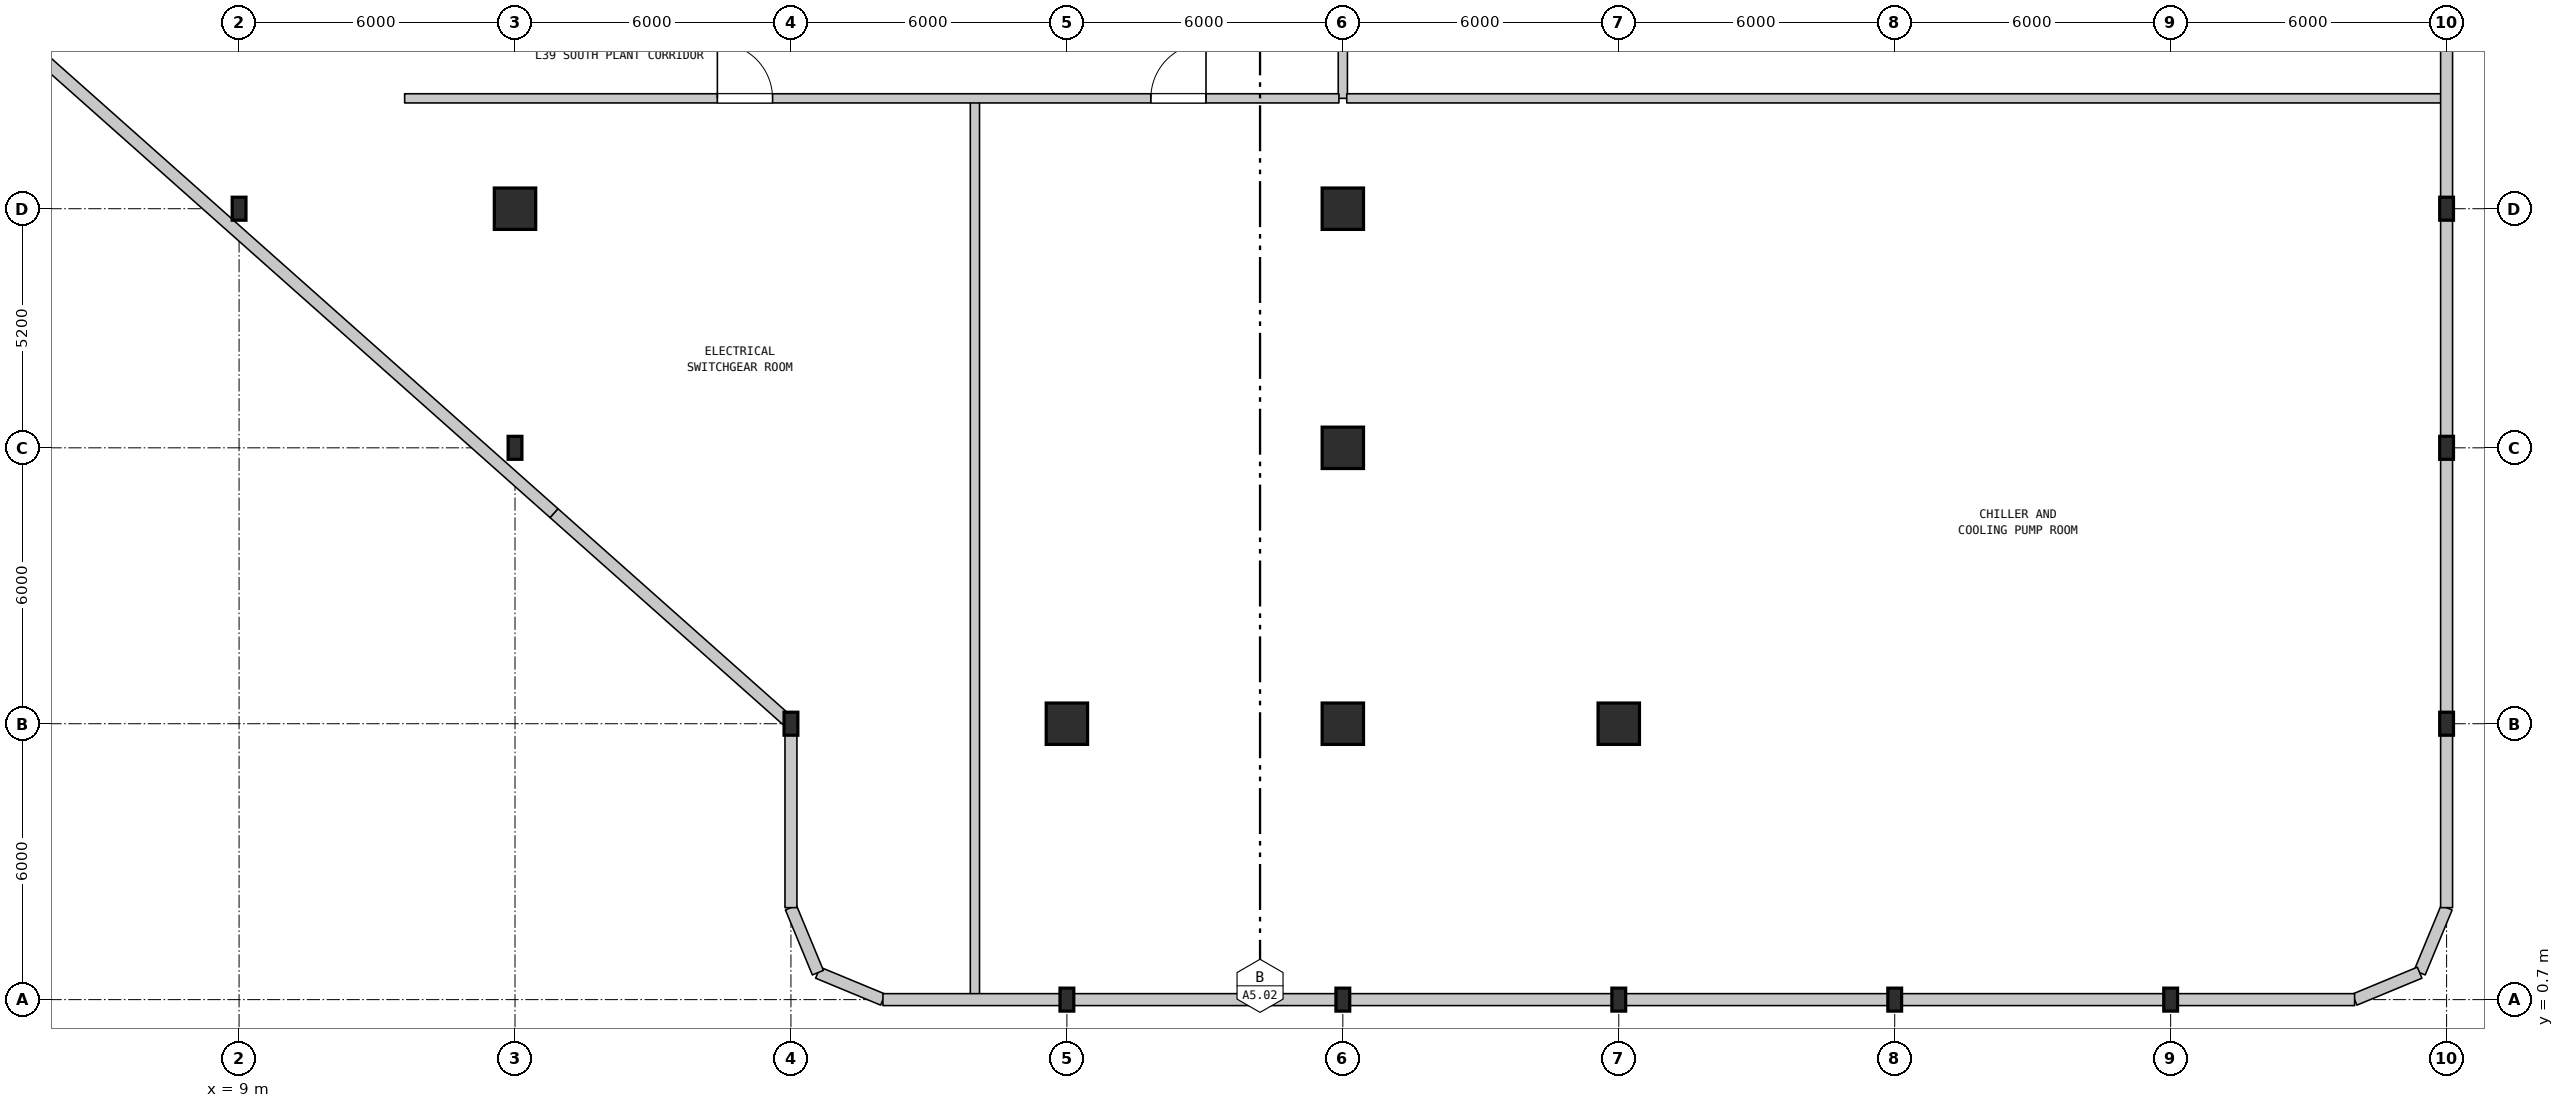
"""IFC4 building model, lengths in metres.
Left out: names, types, materials, properties, quantities, classifications, styles, units other than length and angle.
Written with IfcOpenShell. Run it as: python <this file> out.ifc"""

import sys

from ifc_helpers import new_model, si_unit, direction, frame, frame_2d, origin, origin_2d, place, context, subcontext, project, spatial, rectangle, i_section, extrude, element, fill, save


model = new_model("IFC4")
c1 = context("Model", 3, precision=1e-05, world=origin(), true_north=direction((0.0, 1.0)))
c2 = subcontext(c1, "Body", "Model", "MODEL_VIEW")
j1 = project(units=[si_unit("LENGTHUNIT", "METRE"), si_unit("PLANEANGLEUNIT", "RADIAN")], contexts=[c1])
p1 = place(None, origin())
s1 = spatial("IfcSite", under=j1, at=p1, CompositionType="ELEMENT")
p2 = place(p1, origin())
s2 = spatial("IfcBuilding", under=s1, at=p2, CompositionType="ELEMENT")
p3 = place(p2, frame((0.0, 0.0, 159.4)))
s3 = spatial("IfcBuildingStorey", under=s2, at=p3, CompositionType="ELEMENT", Elevation=159.4)
for number, where, z_axis, x_axis in (
    (1, (9.0, 17.9, 0.0), (0.0, 0.0, 1.0), (1.0, 0.0, 0.0)),
    (2, (15.0, 12.7, 0.0), (0.0, 0.0, 1.0), (1.0, 0.0, 0.0)),
):
    element("IfcColumn", number, at=place(p3, frame(where, z_axis=z_axis, x_axis=x_axis)), inside=s3, PredefinedType="COLUMN", context=c2, shape_type="SweptSolid", body=[
        extrude(i_section(OverallWidth=0.3, OverallDepth=0.5, WebThickness=0.014, FlangeThickness=0.028, FilletRadius=0.027, at=origin_2d()), origin(), (0.0, 0.0, 1.0), 5.2),
    ])
p4 = place(p3, frame((15.0, 17.9, 0.0), z_axis=(0.0, 0.0, 1.0), x_axis=(1.0, 0.0, 0.0)))
e3 = element("IfcColumn", 3, at=p4, inside=s3, PredefinedType="COLUMN", context=c2, shape_type="SweptSolid", body=[
    extrude(rectangle(XDim=0.9, YDim=0.9, at=origin_2d()), origin(), (0.0, 0.0, 1.0), 5.2),
])
for number, where, z_axis, x_axis in (
    (4, (21.0, 6.7, 0.0), (0.0, 0.0, 1.0), (1.0, 0.0, 0.0)),
    (5, (27.0, 0.7, 0.0), (0.0, 0.0, 1.0), (1.0, 0.0, 0.0)),
):
    element("IfcColumn", number, at=place(p3, frame(where, z_axis=z_axis, x_axis=x_axis)), inside=s3, PredefinedType="COLUMN", context=c2, shape_type="SweptSolid", body=[
        extrude(i_section(OverallWidth=0.3, OverallDepth=0.5, WebThickness=0.014, FlangeThickness=0.028, FilletRadius=0.027, at=origin_2d()), origin(), (0.0, 0.0, 1.0), 5.2),
    ])
p5 = place(p3, frame((27.0, 6.7, 0.0), z_axis=(0.0, 0.0, 1.0), x_axis=(1.0, 0.0, 0.0)))
e6 = element("IfcColumn", 6, at=p5, inside=s3, PredefinedType="COLUMN", context=c2, shape_type="SweptSolid", body=[
    extrude(rectangle(XDim=0.9, YDim=0.9, at=origin_2d()), origin(), (0.0, 0.0, 1.0), 5.2),
])
p6 = place(p3, frame((33.0, 0.7, 0.0), z_axis=(0.0, 0.0, 1.0), x_axis=(1.0, 0.0, 0.0)))
e7 = element("IfcColumn", 7, at=p6, inside=s3, PredefinedType="COLUMN", context=c2, shape_type="SweptSolid", body=[
    extrude(i_section(OverallWidth=0.3, OverallDepth=0.5, WebThickness=0.014, FlangeThickness=0.028, FilletRadius=0.027, at=origin_2d()), origin(), (0.0, 0.0, 1.0), 5.2),
])
for number, where, z_axis, x_axis in (
    (8, (33.0, 6.7, 0.0), (0.0, 0.0, 1.0), (1.0, 0.0, 0.0)),
    (9, (33.0, 12.7, 0.0), (0.0, 0.0, 1.0), (1.0, 0.0, 0.0)),
    (10, (33.0, 17.9, 0.0), (0.0, 0.0, 1.0), (1.0, 0.0, 0.0)),
):
    element("IfcColumn", number, at=place(p3, frame(where, z_axis=z_axis, x_axis=x_axis)), inside=s3, PredefinedType="COLUMN", context=c2, shape_type="SweptSolid", body=[
        extrude(rectangle(XDim=0.9, YDim=0.9, at=origin_2d()), origin(), (0.0, 0.0, 1.0), 5.2),
    ])
p7 = place(p3, frame((39.0, 0.7, 0.0), z_axis=(0.0, 0.0, 1.0), x_axis=(1.0, 0.0, 0.0)))
e11 = element("IfcColumn", 11, at=p7, inside=s3, PredefinedType="COLUMN", context=c2, shape_type="SweptSolid", body=[
    extrude(i_section(OverallWidth=0.3, OverallDepth=0.5, WebThickness=0.014, FlangeThickness=0.028, FilletRadius=0.027, at=origin_2d()), origin(), (0.0, 0.0, 1.0), 5.2),
])
p8 = place(p3, frame((39.0, 6.7, 0.0), z_axis=(0.0, 0.0, 1.0), x_axis=(1.0, 0.0, 0.0)))
e12 = element("IfcColumn", 12, at=p8, inside=s3, PredefinedType="COLUMN", context=c2, shape_type="SweptSolid", body=[
    extrude(rectangle(XDim=0.9, YDim=0.9, at=origin_2d()), origin(), (0.0, 0.0, 1.0), 5.2),
])
for number, where, z_axis, x_axis in (
    (13, (45.0, 0.7, 0.0), (0.0, 0.0, 1.0), (1.0, 0.0, 0.0)),
    (14, (51.0, 0.7, 0.0), (0.0, 0.0, 1.0), (1.0, 0.0, 0.0)),
    (15, (57.0, 6.7, 0.0), (0.0, 0.0, 1.0), (1.0, 0.0, 0.0)),
    (16, (57.0, 12.7, 0.0), (0.0, 0.0, 1.0), (1.0, 0.0, 0.0)),
    (17, (57.0, 17.9, 0.0), (0.0, 0.0, 1.0), (1.0, 0.0, 0.0)),
):
    element("IfcColumn", number, at=place(p3, frame(where, z_axis=z_axis, x_axis=x_axis)), inside=s3, PredefinedType="COLUMN", context=c2, shape_type="SweptSolid", body=[
        extrude(i_section(OverallWidth=0.3, OverallDepth=0.5, WebThickness=0.014, FlangeThickness=0.028, FilletRadius=0.027, at=origin_2d()), origin(), (0.0, 0.0, 1.0), 5.2),
    ])
for number, where, z_axis, x_axis in (
    (18, (57.0, 2.7, 0.0), (0.0, 0.0, 1.0), (-0.383, -0.924, 0.0)),
    (19, (56.414, 1.286, 0.0), (0.0, 0.0, 1.0), (-0.924, -0.383, 0.0)),
):
    element("IfcWall", number, at=place(p3, frame(where, z_axis=z_axis, x_axis=x_axis)), inside=s3, PredefinedType="STANDARD", context=c2, shape_type="SweptSolid", body=[
        extrude(rectangle(XDim=1.531, YDim=0.26, at=frame_2d((0.765, 0.0))), origin(), (0.0, 0.0, 1.0), 4.89),
    ])
p9 = place(p3, frame((55.0, 0.7, 0.0), z_axis=(0.0, 0.0, 1.0), x_axis=(-1.0, 0.0, 0.0)))
e20 = element("IfcWall", 20, at=p9, inside=s3, PredefinedType="STANDARD", context=c2, shape_type="SweptSolid", body=[
    extrude(rectangle(XDim=4.0, YDim=0.26, at=frame_2d((2.0, 0.0))), origin(), (0.0, 0.0, 1.0), 4.89),
])
for number, where, z_axis, x_axis in (
    (21, (23.0, 0.7, 0.0), (0.0, 0.0, 1.0), (-0.924, 0.383, 0.0)),
    (22, (21.586, 1.286, 0.0), (0.0, 0.0, 1.0), (-0.383, 0.924, 0.0)),
):
    element("IfcWall", number, at=place(p3, frame(where, z_axis=z_axis, x_axis=x_axis)), inside=s3, PredefinedType="STANDARD", context=c2, shape_type="SweptSolid", body=[
        extrude(rectangle(XDim=1.531, YDim=0.26, at=frame_2d((0.765, 0.0))), origin(), (0.0, 0.0, 1.0), 4.89),
    ])
p10 = place(p3, frame((21.0, 2.7, 0.0), z_axis=(0.0, 0.0, 1.0), x_axis=(0.0, 1.0, 0.0)))
e23 = element("IfcWall", 23, at=p10, inside=s3, PredefinedType="STANDARD", context=c2, shape_type="SweptSolid", body=[
    extrude(rectangle(XDim=4.0, YDim=0.26, at=frame_2d((2.0, 0.0))), origin(), (0.0, 0.0, 1.0), 4.89),
])
p11 = place(p3, frame((21.0, 6.7, 0.0), z_axis=(0.0, 0.0, 1.0), x_axis=(-0.747413226797, 0.664359442177, 0.0)))
e24 = element("IfcWall", 24, at=p11, inside=s3, PredefinedType="STANDARD", context=c2, shape_type="SweptSolid", body=[
    extrude(rectangle(XDim=6.893, YDim=0.26, at=frame_2d((3.447, 0.0))), origin(), (0.0, 0.0, 1.0), 4.19),
])
p12 = place(p3, frame((25.0, 0.71, 0.0), z_axis=(0.0, 0.0, 1.0), x_axis=(0.0, 1.0, 0.0)))
e25 = element("IfcWall", 25, at=p12, inside=s3, PredefinedType="STANDARD", context=c2, shape_type="SweptSolid", body=[
    extrude(rectangle(XDim=19.59, YDim=0.2, at=frame_2d((9.795, 0.0))), origin(), (0.0, 0.0, 1.0), 4.89),
])
p13 = place(p3, frame((33.0, 20.3, 0.0), z_axis=(0.0, 0.0, 1.0), x_axis=(0.0, 1.0, 0.0)))
e26 = element("IfcWall", 26, at=p13, inside=s3, PredefinedType="STANDARD", context=c2, shape_type="SweptSolid", body=[
    extrude(rectangle(XDim=7.6, YDim=0.2, at=frame_2d((3.8, 0.0))), origin(), (0.0, 0.0, 1.0), 4.49),
])
p14 = place(p13, frame((4.6, 0.0, 0.0)))
e27 = element("IfcOpeningElement", 27, at=p14, cuts=e26, PredefinedType="OPENING", context=c2, shape_type="SweptSolid", body=[
    extrude(rectangle(XDim=1.2, YDim=2.2, at=frame_2d((0.6, 1.1))), frame((0.0, 0.11, 0.0), z_axis=(0.0, -1.0, 0.0), x_axis=(1.0, 0.0, 0.0)), (0.0, 0.0, 1.0), 0.22),
])
p15 = place(p3, frame((12.6, 20.3, 0.0), z_axis=(0.0, 0.0, 1.0), x_axis=(1.0, 0.0, 0.0)))
e28 = element("IfcWall", 28, at=p15, inside=s3, PredefinedType="STANDARD", context=c2, shape_type="SweptSolid", body=[
    extrude(rectangle(XDim=20.315, YDim=0.2, at=frame_2d((10.157, 0.0))), origin(), (0.0, 0.0, 1.0), 4.89),
])
p16 = place(p15, frame((6.8, 0.0, 0.0)))
e29 = element("IfcOpeningElement", 29, at=p16, cuts=e28, PredefinedType="OPENING", context=c2, shape_type="SweptSolid", body=[
    extrude(rectangle(XDim=1.2, YDim=2.2, at=frame_2d((0.6, 1.1))), frame((0.0, 0.11, 0.0), z_axis=(0.0, -1.0, 0.0), x_axis=(1.0, 0.0, 0.0)), (0.0, 0.0, 1.0), 0.22),
])
p17 = place(p15, frame((16.225, 0.0, 0.0)))
e30 = element("IfcOpeningElement", 30, at=p17, cuts=e28, PredefinedType="OPENING", context=c2, shape_type="SweptSolid", body=[
    extrude(rectangle(XDim=1.2, YDim=2.2, at=frame_2d((0.6, 1.1))), frame((0.0, 0.11, 0.0), z_axis=(0.0, -1.0, 0.0), x_axis=(1.0, 0.0, 0.0)), (0.0, 0.0, 1.0), 0.22),
])
p18 = place(p3, frame((33.085, 20.3, 0.0), z_axis=(0.0, 0.0, 1.0), x_axis=(1.0, 0.0, 0.0)))
e31 = element("IfcWall", 31, at=p18, inside=s3, PredefinedType="STANDARD", context=c2, shape_type="SweptSolid", body=[
    extrude(rectangle(XDim=23.905, YDim=0.2, at=frame_2d((11.953, 0.0))), origin(), (0.0, 0.0, 1.0), 4.89),
])
p19 = place(p3, frame((51.0, 0.7, 0.0), z_axis=(0.0, 0.0, 1.0), x_axis=(-1.0, 0.0, 0.0)))
e32 = element("IfcWall", 32, at=p19, inside=s3, PredefinedType="STANDARD", context=c2, shape_type="SweptSolid", body=[
    extrude(rectangle(XDim=24.0, YDim=0.26, at=frame_2d((12.0, 0.0))), origin(), (0.0, 0.0, 1.0), 4.59),
])
p20 = place(p3, frame((27.0, 0.7, 0.0), z_axis=(0.0, 0.0, 1.0), x_axis=(-1.0, 0.0, 0.0)))
e33 = element("IfcWall", 33, at=p20, inside=s3, PredefinedType="STANDARD", context=c2, shape_type="SweptSolid", body=[
    extrude(rectangle(XDim=4.0, YDim=0.26, at=frame_2d((2.0, 0.0))), origin(), (0.0, 0.0, 1.0), 4.89),
])
p21 = place(p3, frame((15.848, 11.28, 0.0), z_axis=(0.0, 0.0, 1.0), x_axis=(-0.74740761421, 0.664365756358, 0.0)))
e34 = element("IfcWall", 34, at=p21, inside=s3, PredefinedType="STANDARD", context=c2, shape_type="SweptSolid", body=[
    extrude(rectangle(XDim=15.805, YDim=0.26, at=frame_2d((7.903, 0.0))), origin(), (0.0, 0.0, 1.0), 4.89),
])
p22 = place(p3, frame((57.0, 22.7, 0.0), z_axis=(0.0, 0.0, 1.0), x_axis=(0.0, -1.0, 0.0)))
e35 = element("IfcWall", 35, at=p22, inside=s3, PredefinedType="STANDARD", context=c2, shape_type="SweptSolid", body=[
    extrude(rectangle(XDim=16.0, YDim=0.26, at=frame_2d((8.0, 0.0))), origin(), (0.0, 0.0, 1.0), 4.49),
])
p23 = place(p3, frame((57.0, 6.7, 0.0), z_axis=(0.0, 0.0, 1.0), x_axis=(0.0, -1.0, 0.0)))
e36 = element("IfcWall", 36, at=p23, inside=s3, PredefinedType="STANDARD", context=c2, shape_type="SweptSolid", body=[
    extrude(rectangle(XDim=4.0, YDim=0.26, at=frame_2d((2.0, 0.0))), origin(), (0.0, 0.0, 1.0), 4.89),
])
p24 = place(p16, origin())
e37 = element("IfcDoor", 37, at=p24, inside=s3, OperationType="SINGLE_SWING_LEFT", PredefinedType="DOOR", context=c2, shape_type="SweptSolid", body=[
    extrude(rectangle(XDim=1.2, YDim=2.2, at=frame_2d((0.6, 1.1))), frame((0.0, 0.025, 0.0), z_axis=(0.0, -1.0, 0.0), x_axis=(1.0, 0.0, 0.0)), (0.0, 0.0, 1.0), 0.05),
])
fill(e29, e37)
p25 = place(p17, origin())
e38 = element("IfcDoor", 38, at=p25, inside=s3, OperationType="SINGLE_SWING_RIGHT", PredefinedType="DOOR", context=c2, shape_type="SweptSolid", body=[
    extrude(rectangle(XDim=1.2, YDim=2.2, at=frame_2d((0.6, 1.1))), frame((0.0, 0.025, 0.0), z_axis=(0.0, -1.0, 0.0), x_axis=(1.0, 0.0, 0.0)), (0.0, 0.0, 1.0), 0.05),
])
fill(e30, e38)
save(model, sys.argv[1])
